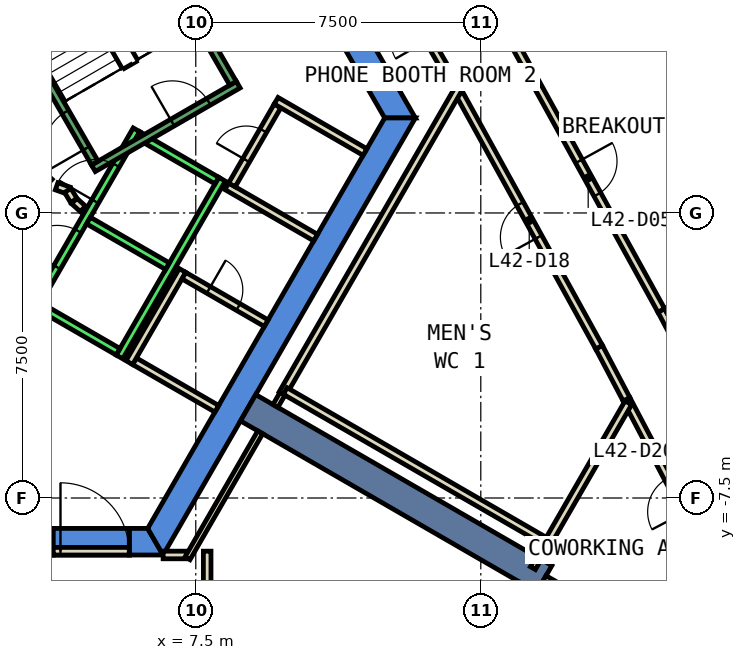
"""IFC4 building model, lengths in metres.
Left out: names, types, materials, properties, quantities, classifications, styles, units other than length and angle.
Written with IfcOpenShell. Run it as: python <this file> out.ifc"""

import sys

from ifc_helpers import new_model, si_unit, direction, frame, frame_2d, origin, place, context, subcontext, project, spatial, polyline, rectangle, outline, extrude, element, fill, save


model = new_model("IFC4")
c1 = context("Model", 3, precision=1e-05, world=origin(), true_north=direction((0.0, 1.0)))
c2 = subcontext(c1, "Body", "Model", "MODEL_VIEW")
j1 = project(units=[si_unit("LENGTHUNIT", "METRE"), si_unit("PLANEANGLEUNIT", "RADIAN")], contexts=[c1])
p1 = place(None, origin())
s1 = spatial("IfcSite", under=j1, at=p1, CompositionType="ELEMENT")
p2 = place(p1, origin())
s2 = spatial("IfcBuilding", under=s1, at=p2, CompositionType="ELEMENT")
p3 = place(p2, frame((0.0, 0.0, 189.8)))
s3 = spatial("IfcBuildingStorey", under=s2, at=p3, CompositionType="ELEMENT", Elevation=189.8)
p4 = place(p3, frame((0.0, 0.0, -0.6)))
e1 = element("IfcWall", 1, at=p4, inside=s3, PredefinedType="SHEAR", context=c2, shape_type="SweptSolid", body=[
    extrude(outline(polyline([(8.084, 11.498), (7.478, 11.148), (12.471, 2.5), (13.279, 2.5), (8.084, 11.498)])), origin(), (0.0, 0.0, 1.0), 4.4),
])
p5 = place(p3, frame((0.0, 0.0, -0.6)))
e2 = element("IfcWall", 2, at=p5, inside=s3, PredefinedType="SHEAR", context=c2, shape_type="SweptSolid", body=[
    extrude(outline(polyline([(3.75, -9.0), (3.75, -8.3), (-6.235, -8.3), (-6.64, -9.0), (3.75, -9.0)])), origin(), (0.0, 0.0, 1.0), 4.4),
])
p6 = place(p3, frame((0.0, 0.0, -0.6)))
e3 = element("IfcWall", 3, at=p6, inside=s3, PredefinedType="SHEAR", context=c2, shape_type="SweptSolid", body=[
    extrude(outline(polyline([(5.75, -8.3), (5.75, -9.0), (6.64, -9.0), (6.235, -8.3), (5.75, -8.3)])), origin(), (0.0, 0.0, 1.0), 4.4),
])
p7 = place(p3, frame((0.0, 0.0, 3.6)))
e4 = element("IfcWall", 4, at=p7, inside=s3, PredefinedType="SHEAR", context=c2, shape_type="SweptSolid", body=[
    extrude(outline(polyline([(5.75, -9.0), (5.75, -8.3), (3.75, -8.3), (3.75, -9.0), (5.75, -9.0)])), origin(), (0.0, 0.0, 1.0), 0.2),
])
p8 = place(p3, frame((0.0, 0.0, -0.6)))
e5 = element("IfcWall", 5, at=p8, inside=s3, PredefinedType="SHEAR", context=c2, shape_type="SweptSolid", body=[
    extrude(outline(polyline([(6.64, -9.0), (13.279, 2.5), (12.471, 2.5), (6.235, -8.3), (6.64, -9.0)])), origin(), (0.0, 0.0, 1.0), 4.4),
])
p9 = place(p3, frame((8.877, -5.125, -0.6), z_axis=(0.0, 0.0, 1.0), x_axis=(0.866017533419, -0.500013631625, 0.0)))
e6 = element("IfcWall", 6, at=p9, inside=s3, PredefinedType="SHEAR", context=c2, shape_type="SweptSolid", body=[
    extrude(rectangle(XDim=9.0, YDim=0.8, at=frame_2d((4.5, 0.0))), origin(), (0.0, 0.0, 1.0), 4.4),
])
p10 = place(p3, frame((14.213, 3.543, 0.0), z_axis=(0.0, 0.0, 1.0), x_axis=(-0.500182898346, 0.865919781621, 0.0)))
e7 = element("IfcWall", 7, at=p10, inside=s3, PredefinedType="PARTITIONING", context=c2, shape_type="SweptSolid", body=[
    extrude(rectangle(XDim=3.35, YDim=0.2, at=frame_2d((1.675, 0.0))), origin(), (0.0, 0.0, 1.0), 3.8),
])
p11 = place(p10, frame((1.175, 0.0, 0.0)))
e8 = element("IfcOpeningElement", 8, at=p11, cuts=e7, PredefinedType="OPENING", context=c2, shape_type="SweptSolid", body=[
    extrude(rectangle(XDim=1.0, YDim=2.1, at=frame_2d((0.5, 1.05))), frame((0.0, 0.11, 0.0), z_axis=(0.0, -1.0, 0.0), x_axis=(1.0, 0.0, 0.0)), (0.0, 0.0, 1.0), 0.22),
])
p12 = place(p3, frame((18.836, -4.906, 0.0), z_axis=(0.0, 0.0, 1.0), x_axis=(-0.465843561357, 0.884867095299, 0.0)))
e9 = element("IfcWall", 9, at=p12, inside=s3, PredefinedType="PARTITIONING", context=c2, shape_type="SweptSolid", body=[
    extrude(rectangle(XDim=1.554, YDim=0.2, at=frame_2d((0.777, 0.0))), origin(), (0.0, 0.0, 1.0), 3.8),
])
p13 = place(p3, frame((18.112, -3.531, 0.0), z_axis=(0.0, 0.0, 1.0), x_axis=(-0.482800061144, 0.875730609811, 0.0)))
e10 = element("IfcWall", 10, at=p13, inside=s3, PredefinedType="PARTITIONING", context=c2, shape_type="SweptSolid", body=[
    extrude(rectangle(XDim=7.612, YDim=0.2, at=frame_2d((3.806, 0.0))), origin(), (0.0, 0.0, 1.0), 3.8),
])
p14 = place(p13, frame((3.306, 0.0, 0.0)))
e11 = element("IfcOpeningElement", 11, at=p14, cuts=e10, PredefinedType="OPENING", context=c2, shape_type="SweptSolid", body=[
    extrude(rectangle(XDim=1.0, YDim=2.1, at=frame_2d((0.5, 1.05))), frame((0.0, 0.11, 0.0), z_axis=(0.0, -1.0, 0.0), x_axis=(1.0, 0.0, 0.0)), (0.0, 0.0, 1.0), 0.22),
])
p15 = place(p3, frame((21.48, -9.935, 0.0), z_axis=(0.0, 0.0, 1.0), x_axis=(-0.465356775138, 0.885123195851, 0.0)))
e12 = element("IfcWall", 12, at=p15, inside=s3, PredefinedType="PARTITIONING", context=c2, shape_type="SweptSolid", body=[
    extrude(rectangle(XDim=5.682, YDim=0.2, at=frame_2d((2.841, 0.0))), origin(), (0.0, 0.0, 1.0), 3.8),
])
p16 = place(p15, frame((2.341, 0.0, 0.0)))
e13 = element("IfcOpeningElement", 13, at=p16, cuts=e12, PredefinedType="OPENING", context=c2, shape_type="SweptSolid", body=[
    extrude(rectangle(XDim=1.0, YDim=2.1, at=frame_2d((0.5, 1.05))), frame((0.0, 0.11, 0.0), z_axis=(0.0, -1.0, 0.0), x_axis=(1.0, 0.0, 0.0)), (0.0, 0.0, 1.0), 0.22),
])
p17 = place(p3, frame((19.75, -2.563, 0.0), z_axis=(0.0, 0.0, 1.0), x_axis=(0.465444987791, -0.885076812113, 0.0)))
e14 = element("IfcWall", 14, at=p17, inside=s3, PredefinedType="PARTITIONING", context=c2, shape_type="SweptSolid", body=[
    extrude(rectangle(XDim=7.578, YDim=0.2, at=frame_2d((3.789, 0.0))), origin(), (0.0, 0.0, 1.0), 3.8),
])
p18 = place(p17, frame((3.289, 0.0, 0.0)))
e15 = element("IfcOpeningElement", 15, at=p18, cuts=e14, PredefinedType="OPENING", context=c2, shape_type="SweptSolid", body=[
    extrude(rectangle(XDim=1.0, YDim=2.1, at=frame_2d((0.5, 1.05))), frame((0.0, 0.11, 0.0), z_axis=(0.0, -1.0, 0.0), x_axis=(1.0, 0.0, 0.0)), (0.0, 0.0, 1.0), 0.22),
])
p19 = place(p3, frame((15.831, 4.542, 0.0), z_axis=(0.0, 0.0, 1.0), x_axis=(0.482835531749, -0.875711053533, 0.0)))
e16 = element("IfcWall", 16, at=p19, inside=s3, PredefinedType="PARTITIONING", context=c2, shape_type="SweptSolid", body=[
    extrude(rectangle(XDim=8.115, YDim=0.2, at=frame_2d((4.057, 0.0))), origin(), (0.0, 0.0, 1.0), 3.8),
])
p20 = place(p19, frame((3.632, 0.0, 0.0)))
e17 = element("IfcOpeningElement", 17, at=p20, cuts=e16, PredefinedType="OPENING", context=c2, shape_type="SweptSolid", body=[
    extrude(rectangle(XDim=1.0, YDim=2.1, at=frame_2d((0.5, 1.05))), frame((0.0, 0.11, 0.0), z_axis=(0.0, -1.0, 0.0), x_axis=(1.0, 0.0, 0.0)), (0.0, 0.0, 1.0), 0.22),
])
p21 = place(p3, frame((8.053, -5.152, 0.0), z_axis=(0.0, 0.0, 1.0), x_axis=(-0.866022959057, 0.500004234368, 0.0)))
e18 = element("IfcWall", 18, at=p21, inside=s3, PredefinedType="PARTITIONING", context=c2, shape_type="SweptSolid", body=[
    extrude(rectangle(XDim=2.5, YDim=0.2, at=frame_2d((1.25, 0.0))), origin(), (0.0, 0.0, 1.0), 3.8),
])
p22 = place(p3, frame((5.751, -3.938, 0.0), z_axis=(0.0, 0.0, 1.0), x_axis=(0.49994636267, 0.866056369097, 0.0)))
e19 = element("IfcWall", 19, at=p22, inside=s3, PredefinedType="PARTITIONING", context=c2, shape_type="SweptSolid", body=[
    extrude(rectangle(XDim=2.8, YDim=0.2, at=frame_2d((1.4, 0.0))), origin(), (0.0, 0.0, 1.0), 3.8),
])
p23 = place(p3, frame((7.188, -1.65, 0.0), z_axis=(0.0, 0.0, 1.0), x_axis=(0.866022959057, -0.500004234368, 0.0)))
e20 = element("IfcWall", 20, at=p23, inside=s3, PredefinedType="PARTITIONING", context=c2, shape_type="SweptSolid", body=[
    extrude(rectangle(XDim=2.5, YDim=0.2, at=frame_2d((1.25, 0.0))), origin(), (0.0, 0.0, 1.0), 3.8),
])
p24 = place(p23, frame((0.75, 0.0, 0.0)))
e21 = element("IfcOpeningElement", 21, at=p24, cuts=e20, PredefinedType="OPENING", context=c2, shape_type="SweptSolid", body=[
    extrude(rectangle(XDim=0.9, YDim=2.1, at=frame_2d((0.45, 1.05))), frame((0.0, 0.11, 0.0), z_axis=(0.0, -1.0, 0.0), x_axis=(1.0, 0.0, 0.0)), (0.0, 0.0, 1.0), 0.22),
])
p25 = place(p3, frame((10.653, -0.648, 0.0), z_axis=(0.0, 0.0, 1.0), x_axis=(-0.866036505625, 0.499980770555, 0.0)))
e22 = element("IfcWall", 22, at=p25, inside=s3, PredefinedType="PARTITIONING", context=c2, shape_type="SweptSolid", body=[
    extrude(rectangle(XDim=2.7, YDim=0.2, at=frame_2d((1.35, 0.0))), origin(), (0.0, 0.0, 1.0), 3.8),
])
p26 = place(p3, frame((8.451, 0.738, 0.0), z_axis=(0.0, 0.0, 1.0), x_axis=(0.499913221443, 0.866075499611, 0.0)))
e23 = element("IfcWall", 23, at=p26, inside=s3, PredefinedType="PARTITIONING", context=c2, shape_type="SweptSolid", body=[
    extrude(rectangle(XDim=2.4, YDim=0.2, at=frame_2d((1.2, 0.0))), origin(), (0.0, 0.0, 1.0), 3.8),
])
p27 = place(p26, frame((0.75, 0.0, 0.0)))
e24 = element("IfcOpeningElement", 24, at=p27, cuts=e23, PredefinedType="OPENING", context=c2, shape_type="SweptSolid", body=[
    extrude(rectangle(XDim=0.9, YDim=2.1, at=frame_2d((0.45, 1.05))), frame((0.0, 0.11, 0.0), z_axis=(0.0, -1.0, 0.0), x_axis=(1.0, 0.0, 0.0)), (0.0, 0.0, 1.0), 0.22),
])
p28 = place(p3, frame((9.615, 2.953, 0.0), z_axis=(0.0, 0.0, 1.0), x_axis=(0.866013897511, -0.50001992892, 0.0)))
e25 = element("IfcWall", 25, at=p28, inside=s3, PredefinedType="PARTITIONING", context=c2, shape_type="SweptSolid", body=[
    extrude(rectangle(XDim=2.7, YDim=0.2, at=frame_2d((1.35, 0.0))), origin(), (0.0, 0.0, 1.0), 3.8),
])
p29 = place(p3, frame((6.641, -8.999, 0.0), z_axis=(0.0, 0.0, 1.0), x_axis=(1.0, 0.0, 0.0)))
e26 = element("IfcWall", 26, at=p29, inside=s3, PredefinedType="PARTITIONING", context=c2, shape_type="SweptSolid", body=[
    extrude(rectangle(XDim=0.617, YDim=0.2, at=frame_2d((0.309, 0.0))), origin(), (0.0, 0.0, 1.0), 3.8),
])
p30 = place(p3, frame((7.283, -9.086, 0.0), z_axis=(0.0, 0.0, 1.0), x_axis=(0.499843936326, 0.866115488442, 0.0)))
e27 = element("IfcWall", 27, at=p30, inside=s3, PredefinedType="PARTITIONING", context=c2, shape_type="SweptSolid", body=[
    extrude(rectangle(XDim=3.827, YDim=0.15, at=frame_2d((1.914, 0.0))), origin(), (0.0, 0.0, 1.0), 3.8),
])
p31 = place(p3, frame((9.781, -4.758, 0.0), z_axis=(0.0, 0.0, 1.0), x_axis=(0.50003174578, 0.866007074574, 0.0)))
e28 = element("IfcWall", 28, at=p31, inside=s3, PredefinedType="PARTITIONING", context=c2, shape_type="SweptSolid", body=[
    extrude(rectangle(XDim=9.315, YDim=0.2, at=frame_2d((4.658, 0.0))), origin(), (0.0, 0.0, 1.0), 3.8),
])
p32 = place(p3, frame((3.838, 0.702, 0.0), z_axis=(0.0, 0.0, 1.0), x_axis=(0.941035081519, -0.338308993895, 0.0)))
e29 = element("IfcWall", 29, at=p32, inside=s3, PredefinedType="PARTITIONING", context=c2, shape_type="SweptSolid", body=[
    extrude(rectangle(XDim=0.337, YDim=0.2, at=frame_2d((0.168, 0.0))), origin(), (0.0, 0.0, 1.0), 3.8),
])
p33 = place(p3, frame((4.132, 0.593, 0.0), z_axis=(0.0, 0.0, 1.0), x_axis=(0.513561617048, -0.858052717201, 0.0)))
e30 = element("IfcWall", 30, at=p33, inside=s3, PredefinedType="PARTITIONING", context=c2, shape_type="SweptSolid", body=[
    extrude(rectangle(XDim=0.308, YDim=0.2, at=frame_2d((0.154, 0.0))), origin(), (0.0, 0.0, 1.0), 3.8),
])
p34 = place(p3, frame((4.301, 0.315, 0.0), z_axis=(0.0, 0.0, 1.0), x_axis=(0.741798017506, -0.670623367639, 0.0)))
e31 = element("IfcWall", 31, at=p34, inside=s3, PredefinedType="PARTITIONING", context=c2, shape_type="SweptSolid", body=[
    extrude(rectangle(XDim=0.309, YDim=0.2, at=frame_2d((0.154, 0.0))), origin(), (0.0, 0.0, 1.0), 3.8),
])
p35 = place(p3, frame((7.8, -8.899, 0.0), z_axis=(0.0, 0.0, 1.0), x_axis=(0.0, -1.0, 0.0)))
e32 = element("IfcWall", 32, at=p35, inside=s3, PredefinedType="PARTITIONING", context=c2, shape_type="SweptSolid", body=[
    extrude(rectangle(XDim=5.025, YDim=0.2, at=frame_2d((2.513, 0.0))), origin(), (0.0, 0.0, 1.0), 3.8),
])
p36 = place(p3, frame((9.853, -4.684, 0.0), z_axis=(0.0, 0.0, 1.0), x_axis=(0.865999791918, -0.500044358431, 0.0)))
e33 = element("IfcWall", 33, at=p36, inside=s3, PredefinedType="PARTITIONING", context=c2, shape_type="SweptSolid", body=[
    extrude(rectangle(XDim=8.075, YDim=0.2, at=frame_2d((4.038, 0.0))), origin(), (0.0, 0.0, 1.0), 3.8),
])
p37 = place(p3, frame((16.71, -8.758, 0.0), z_axis=(0.0, 0.0, 1.0), x_axis=(-0.500013496215, -0.866017611601, 0.0)))
e34 = element("IfcWall", 34, at=p37, inside=s3, PredefinedType="PARTITIONING", context=c2, shape_type="SweptSolid", body=[
    extrude(rectangle(XDim=0.678, YDim=0.15, at=frame_2d((0.339, 0.0))), origin(), (0.0, 0.0, 1.0), 3.8),
])
p38 = place(p3, frame((18.882, -4.995, 0.0), z_axis=(0.0, 0.0, 1.0), x_axis=(-0.499895813511, -0.866085547527, 0.0)))
e35 = element("IfcWall", 35, at=p38, inside=s3, PredefinedType="PARTITIONING", context=c2, shape_type="SweptSolid", body=[
    extrude(rectangle(XDim=4.145, YDim=0.2, at=frame_2d((2.073, 0.0))), origin(), (0.0, 0.0, 1.0), 3.8),
])
p39 = place(p3, frame((16.667, -9.631, 0.0), z_axis=(0.0, 0.0, 1.0), x_axis=(0.866032775405, -0.499987231761, 0.0)))
e36 = element("IfcWall", 36, at=p39, inside=s3, PredefinedType="PARTITIONING", context=c2, shape_type="SweptSolid", body=[
    extrude(rectangle(XDim=5.8, YDim=0.2, at=frame_2d((2.9, 0.0))), origin(), (0.0, 0.0, 1.0), 3.8),
])
p40 = place(p3, frame((19.873, -2.582, 0.0), z_axis=(0.0, 0.0, 1.0), x_axis=(0.880480475723, 0.474082410421, 0.0)))
e37 = element("IfcWall", 37, at=p40, inside=s3, PredefinedType="PARTITIONING", context=c2, shape_type="SweptSolid", body=[
    extrude(rectangle(XDim=4.181, YDim=0.15, at=frame_2d((2.09, 0.0))), origin(), (0.0, 0.0, 1.0), 3.8),
])
p41 = place(p3, frame((3.75, -8.9, 0.0), z_axis=(0.0, 0.0, 1.0), x_axis=(1.0, 0.0, 0.0)))
e38 = element("IfcWall", 38, at=p41, inside=s3, PredefinedType="PARTITIONING", context=c2, shape_type="SweptSolid", body=[
    extrude(rectangle(XDim=2.0, YDim=0.2, at=frame_2d((1.0, 0.0))), origin(), (0.0, 0.0, 1.0), 2.4),
])
p42 = place(p41, frame((0.19, 0.0, 0.0)))
e39 = element("IfcOpeningElement", 39, at=p42, cuts=e38, PredefinedType="OPENING", context=c2, shape_type="SweptSolid", body=[
    extrude(rectangle(XDim=1.8, YDim=2.1, at=frame_2d((0.9, 1.05))), frame((0.0, 0.11, 0.0), z_axis=(0.0, -1.0, 0.0), x_axis=(1.0, 0.0, 0.0)), (0.0, 0.0, 1.0), 0.22),
])
p43 = place(p3, frame((9.596, -5.078, 0.0), z_axis=(0.0, 0.0, 1.0), x_axis=(0.500827895298, 0.86554689029, 0.0)))
e40 = element("IfcWall", 40, at=p43, inside=s3, PredefinedType="PARTITIONING", context=c2, shape_type="SweptSolid", body=[
    extrude(rectangle(XDim=0.369, YDim=0.15, at=frame_2d((0.185, 0.0))), origin(), (0.0, 0.0, 1.0), 3.8),
])
p44 = place(p3, frame((3.24, -2.488, 0.0), z_axis=(0.0, 0.0, 1.0), x_axis=(0.500034260056, 0.866005622828, 0.0)))
e41 = element("IfcWall", 41, at=p44, inside=s3, PredefinedType="STANDARD", context=c2, shape_type="SweptSolid", body=[
    extrude(rectangle(XDim=5.399, YDim=0.2, at=frame_2d((2.7, 0.0))), origin(), (0.0, 0.0, 1.0), 3.8),
])
p45 = place(p44, frame((3.225, 0.0, 0.0)))
e42 = element("IfcOpeningElement", 42, at=p45, cuts=e41, PredefinedType="OPENING", context=c2, shape_type="SweptSolid", body=[
    extrude(rectangle(XDim=1.1, YDim=2.1, at=frame_2d((0.55, 1.05))), frame((0.0, 0.11, 0.0), z_axis=(0.0, -1.0, 0.0), x_axis=(1.0, 0.0, 0.0)), (0.0, 0.0, 1.0), 0.22),
])
p46 = place(p44, frame((1.225, 0.0, 0.0)))
e43 = element("IfcOpeningElement", 43, at=p46, cuts=e41, PredefinedType="OPENING", context=c2, shape_type="SweptSolid", body=[
    extrude(rectangle(XDim=1.1, YDim=2.1, at=frame_2d((0.55, 1.05))), frame((0.0, 0.11, 0.0), z_axis=(0.0, -1.0, 0.0), x_axis=(1.0, 0.0, 0.0)), (0.0, 0.0, 1.0), 0.22),
])
p47 = place(p3, frame((5.492, -3.788, 0.0), z_axis=(0.0, 0.0, 1.0), x_axis=(0.500034260056, 0.866005622828, 0.0)))
e44 = element("IfcWall", 44, at=p47, inside=s3, PredefinedType="STANDARD", context=c2, shape_type="SweptSolid", body=[
    extrude(rectangle(XDim=5.399, YDim=0.2, at=frame_2d((2.7, 0.0))), origin(), (0.0, 0.0, 1.0), 3.8),
])
p48 = place(p3, frame((3.377, -2.452, 0.0), z_axis=(0.0, 0.0, 1.0), x_axis=(0.865955154139, -0.50012165622, 0.0)))
e45 = element("IfcWall", 45, at=p48, inside=s3, PredefinedType="STANDARD", context=c2, shape_type="SweptSolid", body=[
    extrude(rectangle(XDim=2.4, YDim=0.2, at=frame_2d((1.2, 0.0))), origin(), (0.0, 0.0, 1.0), 3.8),
])
for number, where, z_axis, x_axis in (
    (46, (4.677, -0.2, 0.0), (0.0, 0.0, 1.0), (0.866, -0.5, 0.0)),
    (47, (5.977, 2.052, 0.0), (0.0, 0.0, 1.0), (0.866, -0.5, 0.0)),
):
    element("IfcWall", number, at=place(p3, frame(where, z_axis=z_axis, x_axis=x_axis)), inside=s3, PredefinedType="STANDARD", context=c2, shape_type="SweptSolid", body=[
        extrude(rectangle(XDim=2.399, YDim=0.2, at=frame_2d((1.2, 0.0))), origin(), (0.0, 0.0, 1.0), 3.8),
    ])
p49 = place(p3, frame((4.806, 1.176, 0.0), z_axis=(0.0, 0.0, 1.0), x_axis=(0.866059941101, 0.499940174841, 0.0)))
e48 = element("IfcWall", 48, at=p49, inside=s3, PredefinedType="STANDARD", context=c2, shape_type="SweptSolid", body=[
    extrude(rectangle(XDim=4.4, YDim=0.2, at=frame_2d((2.2, 0.0))), origin(), (0.0, 0.0, 1.0), 3.8),
])
p50 = place(p49, frame((2.4, 0.0, 0.0)))
e49 = element("IfcOpeningElement", 49, at=p50, cuts=e48, PredefinedType="OPENING", context=c2, shape_type="SweptSolid", body=[
    extrude(rectangle(XDim=1.1, YDim=2.2, at=frame_2d((0.55, 1.1))), frame((0.0, 0.11, 0.0), z_axis=(0.0, -1.0, 0.0), x_axis=(1.0, 0.0, 0.0)), (0.0, 0.0, 1.0), 0.22),
])
p51 = place(p3, frame((4.843, 1.312, 0.0), z_axis=(0.0, 0.0, 1.0), x_axis=(-0.499963383562, 0.866046543262, 0.0)))
e50 = element("IfcWall", 50, at=p51, inside=s3, PredefinedType="STANDARD", context=c2, shape_type="SweptSolid", body=[
    extrude(rectangle(XDim=6.9, YDim=0.2, at=frame_2d((3.45, 0.0))), origin(), (0.0, 0.0, 1.0), 3.8),
])
p52 = place(p51, frame((0.45, 0.0, 0.0)))
e51 = element("IfcOpeningElement", 51, at=p52, cuts=e50, PredefinedType="OPENING", context=c2, shape_type="SweptSolid", body=[
    extrude(rectangle(XDim=1.1, YDim=2.2, at=frame_2d((0.55, 1.1))), frame((0.0, 0.11, 0.0), z_axis=(0.0, -1.0, 0.0), x_axis=(1.0, 0.0, 0.0)), (0.0, 0.0, 1.0), 0.22),
])
p53 = place(p3, frame((8.48, 3.412, 0.0), z_axis=(0.0, 0.0, 1.0), x_axis=(-0.499978703459, 0.866037698999, 0.0)))
e52 = element("IfcWall", 52, at=p53, inside=s3, PredefinedType="STANDARD", context=c2, shape_type="SweptSolid", body=[
    extrude(rectangle(XDim=6.9, YDim=0.2, at=frame_2d((3.45, 0.0))), origin(), (0.0, 0.0, 1.0), 3.8),
])
p54 = place(p20, origin())
e53 = element("IfcDoor", 53, at=p54, inside=s3, OperationType="SINGLE_SWING_RIGHT", PredefinedType="DOOR", context=c2, shape_type="SweptSolid", body=[
    extrude(rectangle(XDim=1.0, YDim=2.1, at=frame_2d((0.5, 1.05))), frame((0.0, 0.025, 0.0), z_axis=(0.0, -1.0, 0.0), x_axis=(1.0, 0.0, 0.0)), (0.0, 0.0, 1.0), 0.05),
])
fill(e17, e53)
p55 = place(p14, origin())
e54 = element("IfcDoor", 54, at=p55, inside=s3, OperationType="SINGLE_SWING_LEFT", PredefinedType="DOOR", context=c2, shape_type="SweptSolid", body=[
    extrude(rectangle(XDim=1.0, YDim=2.1, at=frame_2d((0.5, 1.05))), frame((0.0, 0.025, 0.0), z_axis=(0.0, -1.0, 0.0), x_axis=(1.0, 0.0, 0.0)), (0.0, 0.0, 1.0), 0.05),
])
fill(e11, e54)
p56 = place(p24, origin())
e55 = element("IfcDoor", 55, at=p56, inside=s3, OperationType="SINGLE_SWING_RIGHT", PredefinedType="DOOR", context=c2, shape_type="SweptSolid", body=[
    extrude(rectangle(XDim=0.9, YDim=2.1, at=frame_2d((0.45, 1.05))), frame((0.0, 0.025, 0.0), z_axis=(0.0, -1.0, 0.0), x_axis=(1.0, 0.0, 0.0)), (0.0, 0.0, 1.0), 0.05),
])
fill(e21, e55)
p57 = place(p27, origin())
e56 = element("IfcDoor", 56, at=p57, inside=s3, OperationType="SINGLE_SWING_LEFT", PredefinedType="DOOR", context=c2, shape_type="SweptSolid", body=[
    extrude(rectangle(XDim=0.9, YDim=2.1, at=frame_2d((0.45, 1.05))), frame((0.0, 0.025, 0.0), z_axis=(0.0, -1.0, 0.0), x_axis=(1.0, 0.0, 0.0)), (0.0, 0.0, 1.0), 0.05),
])
fill(e24, e56)
p58 = place(p42, origin())
e57 = element("IfcDoor", 57, at=p58, inside=s3, OperationType="DOUBLE_DOOR_SINGLE_SWING", PredefinedType="DOOR", context=c2, shape_type="SweptSolid", body=[
    extrude(rectangle(XDim=1.8, YDim=2.1, at=frame_2d((0.9, 1.05))), frame((0.0, 0.025, 0.0), z_axis=(0.0, -1.0, 0.0), x_axis=(1.0, 0.0, 0.0)), (0.0, 0.0, 1.0), 0.05),
])
fill(e39, e57)
p59 = place(p45, origin())
e58 = element("IfcDoor", 58, at=p59, inside=s3, OperationType="SLIDING_TO_LEFT", PredefinedType="DOOR", context=c2, shape_type="SweptSolid", body=[
    extrude(rectangle(XDim=1.1, YDim=2.1, at=frame_2d((0.55, 1.05))), frame((0.0, 0.025, 0.0), z_axis=(0.0, -1.0, 0.0), x_axis=(1.0, 0.0, 0.0)), (0.0, 0.0, 1.0), 0.05),
])
fill(e42, e58)
p60 = place(p46, origin())
e59 = element("IfcDoor", 59, at=p60, inside=s3, OperationType="SLIDING_TO_LEFT", PredefinedType="DOOR", context=c2, shape_type="SweptSolid", body=[
    extrude(rectangle(XDim=1.1, YDim=2.1, at=frame_2d((0.55, 1.05))), frame((0.0, 0.025, 0.0), z_axis=(0.0, -1.0, 0.0), x_axis=(1.0, 0.0, 0.0)), (0.0, 0.0, 1.0), 0.05),
])
fill(e43, e59)
p61 = place(p52, origin())
e60 = element("IfcDoor", 60, at=p61, inside=s3, OperationType="SINGLE_SWING_LEFT", PredefinedType="DOOR", context=c2, shape_type="SweptSolid", body=[
    extrude(rectangle(XDim=1.1, YDim=2.2, at=frame_2d((0.55, 1.1))), frame((0.0, 0.025, 0.0), z_axis=(0.0, -1.0, 0.0), x_axis=(1.0, 0.0, 0.0)), (0.0, 0.0, 1.0), 0.05),
])
fill(e51, e60)
p62 = place(p50, origin())
e61 = element("IfcDoor", 61, at=p62, inside=s3, OperationType="SINGLE_SWING_LEFT", PredefinedType="DOOR", context=c2, shape_type="SweptSolid", body=[
    extrude(rectangle(XDim=1.1, YDim=2.2, at=frame_2d((0.55, 1.1))), frame((0.0, 0.025, 0.0), z_axis=(0.0, -1.0, 0.0), x_axis=(1.0, 0.0, 0.0)), (0.0, 0.0, 1.0), 0.05),
])
fill(e49, e61)
save(model, sys.argv[1])
